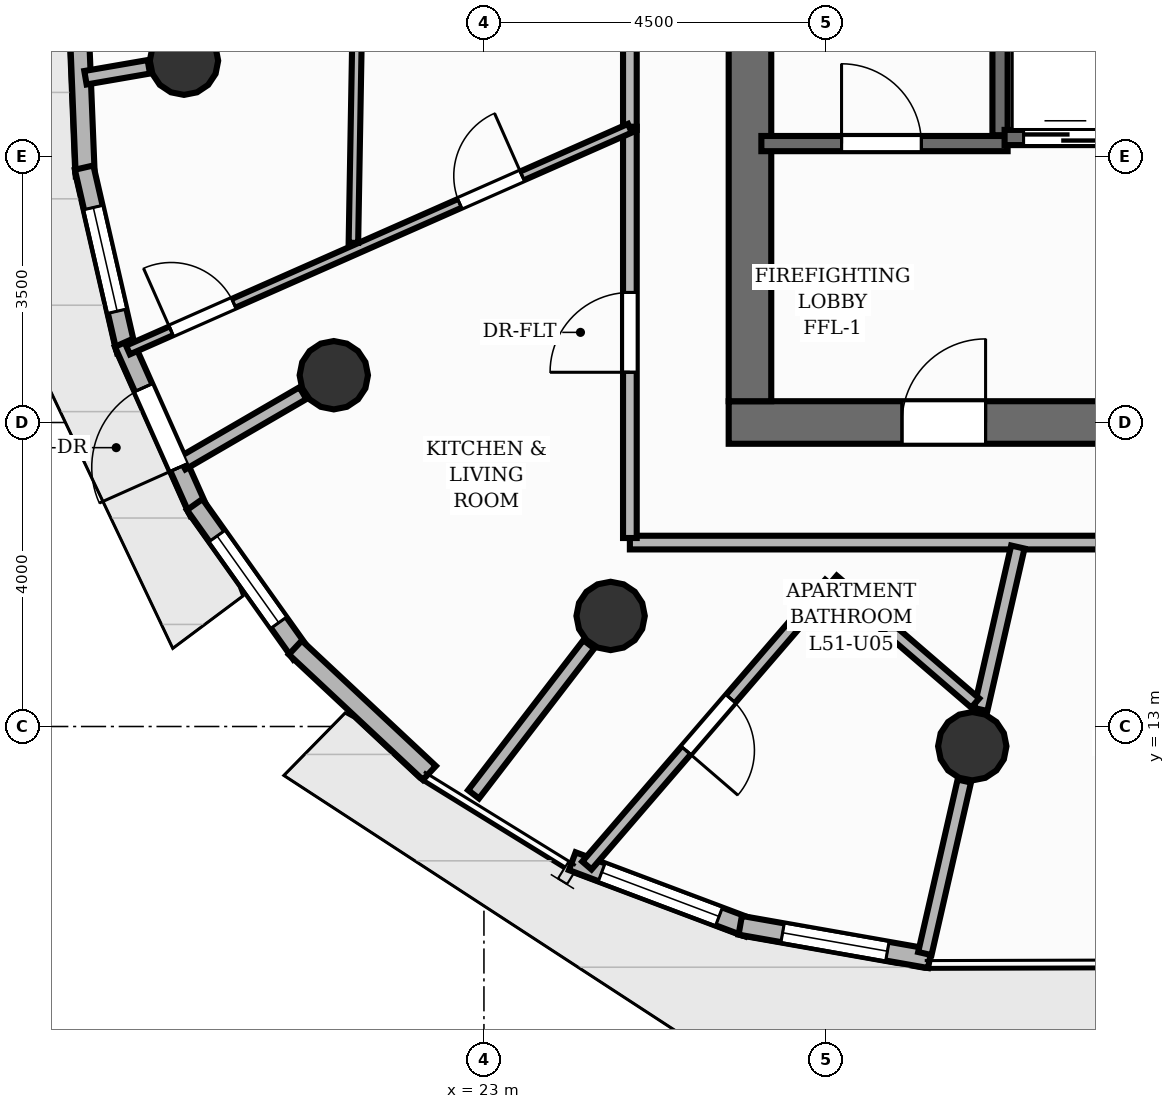
"""IFC4 building model, lengths in metres.
Left out: names, types, materials, properties, quantities, classifications, styles, units other than length and angle.
Written with IfcOpenShell. Run it as: python <this file> out.ifc"""

import sys

from ifc_helpers import new_model, si_unit, direction, frame, frame_2d, origin, origin_2d, place, context, subcontext, project, spatial, rectangle, circle, extrude, element, fill, save


model = new_model("IFC4")
c1 = context("Model", 3, precision=1e-05, world=origin(), true_north=direction((0.0, 1.0)))
c2 = subcontext(c1, "Body", "Model", "MODEL_VIEW")
j1 = project(units=[si_unit("LENGTHUNIT", "METRE"), si_unit("PLANEANGLEUNIT", "RADIAN")], contexts=[c1])
p1 = place(None, origin())
s1 = spatial("IfcSite", under=j1, at=p1, CompositionType="ELEMENT")
p2 = place(p1, origin())
s2 = spatial("IfcBuilding", under=s1, at=p2, CompositionType="ELEMENT")
p3 = place(p2, frame((0.0, 0.0, 172.64)))
s3 = spatial("IfcBuildingStorey", under=s2, at=p3, CompositionType="ELEMENT", Elevation=172.64)
p4 = place(p3, frame((26.22, 17.0, 0.0), z_axis=(0.0, 0.0, 1.0), x_axis=(1.0, 0.0, 0.0)))
e1 = element("IfcWall", 1, at=p4, inside=s3, PredefinedType="SHEAR", context=c2, shape_type="SweptSolid", body=[
    extrude(rectangle(XDim=11.56, YDim=0.56, at=frame_2d((5.78, 0.0))), origin(), (0.0, 0.0, 1.0), 3.2),
])
p5 = place(p4, frame((2.28, 0.0, 0.0)))
e2 = element("IfcOpeningElement", 2, at=p5, cuts=e1, PredefinedType="OPENING", context=c2, shape_type="SweptSolid", body=[
    extrude(rectangle(XDim=1.1, YDim=2.15, at=frame_2d((0.55, 1.075))), frame((0.0, 0.29, 0.0), z_axis=(0.0, -1.0, 0.0), x_axis=(1.0, 0.0, 0.0)), (0.0, 0.0, 1.0), 0.58),
])
p6 = place(p4, frame((5.83, 0.0, 0.0)))
e3 = element("IfcOpeningElement", 3, at=p6, cuts=e1, PredefinedType="OPENING", context=c2, shape_type="SweptSolid", body=[
    extrude(rectangle(XDim=0.9, YDim=2.1, at=frame_2d((0.45, 1.05))), frame((0.0, 0.29, 0.0), z_axis=(0.0, -1.0, 0.0), x_axis=(1.0, 0.0, 0.0)), (0.0, 0.0, 1.0), 0.58),
])
p7 = place(p3, frame((26.5, 17.28, 0.0), z_axis=(0.0, 0.0, 1.0), x_axis=(0.0, 1.0, 0.0)))
e4 = element("IfcWall", 4, at=p7, inside=s3, PredefinedType="SHEAR", context=c2, shape_type="SweptSolid", body=[
    extrude(rectangle(XDim=13.44, YDim=0.56, at=frame_2d((6.72, 0.0))), origin(), (0.0, 0.0, 1.0), 3.2),
])
for number, where, z_axis, x_axis in (
    (5, (19.054, 21.76, 0.0), (0.0, 0.0, 1.0), (1.0, 0.0, 0.0)),
    (6, (21.025, 17.622, 0.0), (0.0, 0.0, 1.0), (1.0, 0.0, 0.0)),
    (7, (24.667, 14.455, 0.0), (0.0, 0.0, 1.0), (1.0, 0.0, 0.0)),
    (8, (29.425, 12.74, 0.0), (0.0, 0.0, 1.0), (1.0, 0.0, 0.0)),
):
    element("IfcColumn", number, at=place(p3, frame(where, z_axis=z_axis, x_axis=x_axis)), inside=s3, PredefinedType="COLUMN", context=c2, shape_type="SweptSolid", body=[
        extrude(circle(Radius=0.45, at=origin_2d()), origin(), (0.0, 0.0, 1.0), 3.2),
    ])
p8 = place(p3, frame((17.755, 20.242, 0.0), z_axis=(0.0, 0.0, 1.0), x_axis=(-0.040399298921, 0.999183615081, 0.0)))
e9 = element("IfcWall", 9, at=p8, inside=s3, PredefinedType="SOLIDWALL", context=c2, shape_type="SweptSolid", body=[
    extrude(rectangle(XDim=2.532, YDim=0.25, at=frame_2d((1.266, 0.0))), origin(), (0.0, 0.0, 1.0), 2.96),
])
p9 = place(p3, frame((18.295, 17.939, 0.0), z_axis=(0.0, 0.0, 1.0), x_axis=(-0.224175769227, 0.974548728639, 0.0)))
e10 = element("IfcWall", 10, at=p9, inside=s3, PredefinedType="SOLIDWALL", context=c2, shape_type="SweptSolid", body=[
    extrude(rectangle(XDim=2.478, YDim=0.25, at=frame_2d((1.239, 0.0))), origin(), (0.0, 0.0, 1.0), 2.96),
])
p10 = place(p9, frame((0.539, 0.0, 0.85)))
e11 = element("IfcOpeningElement", 11, at=p10, cuts=e10, PredefinedType="OPENING", context=c2, shape_type="SweptSolid", body=[
    extrude(rectangle(XDim=1.4, YDim=1.55, at=frame_2d((0.7, 0.775))), frame((0.0, 0.135, 0.0), z_axis=(0.0, -1.0, 0.0), x_axis=(1.0, 0.0, 0.0)), (0.0, 0.0, 1.0), 0.27),
])
p11 = place(p3, frame((19.251, 15.821, 0.0), z_axis=(0.0, 0.0, 1.0), x_axis=(-0.407346511056, 0.913273682929, 0.0)))
e12 = element("IfcWall", 12, at=p11, inside=s3, PredefinedType="SOLIDWALL", context=c2, shape_type="SweptSolid", body=[
    extrude(rectangle(XDim=2.437, YDim=0.25, at=frame_2d((1.219, 0.0))), origin(), (0.0, 0.0, 1.0), 2.96),
])
p12 = place(p11, frame((0.643, 0.0, 0.0)))
e13 = element("IfcOpeningElement", 13, at=p12, cuts=e12, PredefinedType="OPENING", context=c2, shape_type="SweptSolid", body=[
    extrude(rectangle(XDim=1.15, YDim=2.2, at=frame_2d((0.575, 1.1))), frame((0.0, 0.135, 0.0), z_axis=(0.0, -1.0, 0.0), x_axis=(1.0, 0.0, 0.0)), (0.0, 0.0, 1.0), 0.27),
])
p13 = place(p3, frame((20.594, 13.953, 0.0), z_axis=(0.0, 0.0, 1.0), x_axis=(-0.579505880656, 0.814968057217, 0.0)))
e14 = element("IfcWall", 14, at=p13, inside=s3, PredefinedType="SOLIDWALL", context=c2, shape_type="SweptSolid", body=[
    extrude(rectangle(XDim=2.415, YDim=0.25, at=frame_2d((1.208, 0.0))), origin(), (0.0, 0.0, 1.0), 2.96),
])
p14 = place(p13, frame((0.507, 0.0, 0.85)))
e15 = element("IfcOpeningElement", 15, at=p14, cuts=e14, PredefinedType="OPENING", context=c2, shape_type="SweptSolid", body=[
    extrude(rectangle(XDim=1.4, YDim=1.55, at=frame_2d((0.7, 0.775))), frame((0.0, 0.135, 0.0), z_axis=(0.0, -1.0, 0.0), x_axis=(1.0, 0.0, 0.0)), (0.0, 0.0, 1.0), 0.27),
])
p15 = place(p3, frame((22.282, 12.389, 0.0), z_axis=(0.0, 0.0, 1.0), x_axis=(-0.730224222865, 0.683207570465, 0.0)))
e16 = element("IfcWall", 16, at=p15, inside=s3, PredefinedType="SOLIDWALL", context=c2, shape_type="SweptSolid", body=[
    extrude(rectangle(XDim=2.415, YDim=0.25, at=frame_2d((1.207, 0.0))), origin(), (0.0, 0.0, 1.0), 2.96),
])
p16 = place(p3, frame((26.481, 10.355, 0.0), z_axis=(0.0, 0.0, 1.0), x_axis=(-0.93586674787, 0.352354126172, 0.0)))
e17 = element("IfcWall", 17, at=p16, inside=s3, PredefinedType="SOLIDWALL", context=c2, shape_type="SweptSolid", body=[
    extrude(rectangle(XDim=2.478, YDim=0.25, at=frame_2d((1.239, 0.0))), origin(), (0.0, 0.0, 1.0), 2.96),
])
p17 = place(p16, frame((0.414, 0.0, 0.85)))
e18 = element("IfcOpeningElement", 18, at=p17, cuts=e17, PredefinedType="OPENING", context=c2, shape_type="SweptSolid", body=[
    extrude(rectangle(XDim=1.65, YDim=1.55, at=frame_2d((0.825, 0.775))), frame((0.0, 0.135, 0.0), z_axis=(0.0, -1.0, 0.0), x_axis=(1.0, 0.0, 0.0)), (0.0, 0.0, 1.0), 0.27),
])
p18 = place(p3, frame((28.865, 9.945, 0.0), z_axis=(0.0, 0.0, 1.0), x_axis=(-0.984837873762, 0.173477267688, 0.0)))
e19 = element("IfcWall", 19, at=p18, inside=s3, PredefinedType="SOLIDWALL", context=c2, shape_type="SweptSolid", body=[
    extrude(rectangle(XDim=2.532, YDim=0.25, at=frame_2d((1.266, 0.0))), origin(), (0.0, 0.0, 1.0), 2.96),
])
p19 = place(p18, frame((0.566, 0.0, 0.85)))
e20 = element("IfcOpeningElement", 20, at=p19, cuts=e19, PredefinedType="OPENING", context=c2, shape_type="SweptSolid", body=[
    extrude(rectangle(XDim=1.4, YDim=1.55, at=frame_2d((0.7, 0.775))), frame((0.0, 0.135, 0.0), z_axis=(0.0, -1.0, 0.0), x_axis=(1.0, 0.0, 0.0)), (0.0, 0.0, 1.0), 0.27),
])
p20 = place(p3, frame((29.79, 20.78, 0.0), z_axis=(0.0, 0.0, 1.0), x_axis=(0.0, 1.0, 0.0)))
e21 = element("IfcWall", 21, at=p20, inside=s3, PredefinedType="SHEAR", context=c2, shape_type="SweptSolid", body=[
    extrude(rectangle(XDim=6.44, YDim=0.2, at=frame_2d((3.22, 0.0))), origin(), (0.0, 0.0, 1.0), 3.2),
])
p21 = place(p3, frame((26.65, 20.67, 0.0), z_axis=(0.0, 0.0, 1.0), x_axis=(1.0, 0.0, 0.0)))
e22 = element("IfcWall", 22, at=p21, inside=s3, PredefinedType="SHEAR", context=c2, shape_type="SweptSolid", body=[
    extrude(rectangle(XDim=3.24, YDim=0.2, at=frame_2d((1.62, 0.0))), origin(), (0.0, 0.0, 1.0), 3.2),
])
p22 = place(p21, frame((1.055, 0.0, 0.0)))
e23 = element("IfcOpeningElement", 23, at=p22, cuts=e22, PredefinedType="OPENING", context=c2, shape_type="SweptSolid", body=[
    extrude(rectangle(XDim=1.05, YDim=2.15, at=frame_2d((0.525, 1.075))), frame((0.0, 0.11, 0.0), z_axis=(0.0, -1.0, 0.0), x_axis=(1.0, 0.0, 0.0)), (0.0, 0.0, 1.0), 0.22),
])
p23 = place(p3, frame((29.85, 20.75, 0.0), z_axis=(0.0, 0.0, 1.0), x_axis=(1.0, 0.0, 0.0)))
e24 = element("IfcWall", 24, at=p23, inside=s3, PredefinedType="SHEAR", context=c2, shape_type="SweptSolid", body=[
    extrude(rectangle(XDim=2.3, YDim=0.2, at=frame_2d((1.15, 0.0))), origin(), (0.0, 0.0, 1.0), 3.2),
])
p24 = place(p23, frame((0.25, 0.0, 0.0)))
e25 = element("IfcOpeningElement", 25, at=p24, cuts=e24, PredefinedType="OPENING", context=c2, shape_type="SweptSolid", body=[
    extrude(rectangle(XDim=1.1, YDim=2.15, at=frame_2d((0.55, 1.075))), frame((0.0, 0.11, 0.0), z_axis=(0.0, -1.0, 0.0), x_axis=(1.0, 0.0, 0.0)), (0.0, 0.0, 1.0), 0.22),
])
p25 = place(p3, frame((18.591, 21.68, 0.0), z_axis=(0.0, 0.0, 1.0), x_axis=(-0.985336508055, -0.170622290144, 0.0)))
e26 = element("IfcWall", 26, at=p25, inside=s3, PredefinedType="PARTITIONING", context=c2, shape_type="SweptSolid", body=[
    extrude(rectangle(XDim=0.846, YDim=0.18, at=frame_2d((0.423, 0.0))), origin(), (0.0, 0.0, 1.0), 2.404),
])
p26 = place(p3, frame((20.618, 17.386, 0.0), z_axis=(0.0, 0.0, 1.0), x_axis=(-0.864604991586, -0.502452195264, 0.0)))
e27 = element("IfcWall", 27, at=p26, inside=s3, PredefinedType="PARTITIONING", context=c2, shape_type="SweptSolid", body=[
    extrude(rectangle(XDim=1.841, YDim=0.18, at=frame_2d((0.92, 0.0))), origin(), (0.0, 0.0, 1.0), 2.404),
])
p27 = place(p3, frame((24.38, 14.082, 0.0), z_axis=(0.0, 0.0, 1.0), x_axis=(-0.609279402228, -0.792955616678, 0.0)))
e28 = element("IfcWall", 28, at=p27, inside=s3, PredefinedType="PARTITIONING", context=c2, shape_type="SweptSolid", body=[
    extrude(rectangle(XDim=2.49, YDim=0.18, at=frame_2d((1.245, 0.0))), origin(), (0.0, 0.0, 1.0), 2.404),
])
p28 = place(p3, frame((29.32, 12.282, 0.0), z_axis=(0.0, 0.0, 1.0), x_axis=(-0.222998449778, -0.974818799263, 0.0)))
e29 = element("IfcWall", 29, at=p28, inside=s3, PredefinedType="PARTITIONING", context=c2, shape_type="SweptSolid", body=[
    extrude(rectangle(XDim=2.329, YDim=0.18, at=frame_2d((1.164, 0.0))), origin(), (0.0, 0.0, 1.0), 2.404),
])
p29 = place(p3, frame((39.08, 15.42, 0.0), z_axis=(0.0, 0.0, 1.0), x_axis=(-1.0, 0.0, 0.0)))
e30 = element("IfcWall", 30, at=p29, inside=s3, PredefinedType="PARTITIONING", context=c2, shape_type="SweptSolid", body=[
    extrude(rectangle(XDim=14.16, YDim=0.18, at=frame_2d((7.08, 0.0))), origin(), (0.0, 0.0, 1.0), 2.955),
])
p30 = place(p29, frame((2.007, 0.0, 0.0)))
e31 = element("IfcOpeningElement", 31, at=p30, cuts=e30, PredefinedType="OPENING", context=c2, shape_type="SweptSolid", body=[
    extrude(rectangle(XDim=0.9, YDim=2.1, at=frame_2d((0.45, 1.05))), frame((0.0, 0.1, 0.0), z_axis=(0.0, -1.0, 0.0), x_axis=(1.0, 0.0, 0.0)), (0.0, 0.0, 1.0), 0.2),
])
p31 = place(p29, frame((6.287, 0.0, 0.0)))
e32 = element("IfcOpeningElement", 32, at=p31, cuts=e30, PredefinedType="OPENING", context=c2, shape_type="SweptSolid", body=[
    extrude(rectangle(XDim=0.9, YDim=2.1, at=frame_2d((0.45, 1.05))), frame((0.0, 0.1, 0.0), z_axis=(0.0, -1.0, 0.0), x_axis=(1.0, 0.0, 0.0)), (0.0, 0.0, 1.0), 0.2),
])
p32 = place(p3, frame((24.92, 20.85, 0.0), z_axis=(0.0, 0.0, 1.0), x_axis=(0.0, 1.0, 0.0)))
e33 = element("IfcWall", 33, at=p32, inside=s3, PredefinedType="PARTITIONING", context=c2, shape_type="SweptSolid", body=[
    extrude(rectangle(XDim=11.67, YDim=0.18, at=frame_2d((5.835, 0.0))), origin(), (0.0, 0.0, 1.0), 2.955),
])
p33 = place(p3, frame((24.92, 15.48, 0.0), z_axis=(0.0, 0.0, 1.0), x_axis=(0.0, 1.0, 0.0)))
e34 = element("IfcWall", 34, at=p33, inside=s3, PredefinedType="PARTITIONING", context=c2, shape_type="SweptSolid", body=[
    extrude(rectangle(XDim=5.412, YDim=0.18, at=frame_2d((2.706, 0.0))), origin(), (0.0, 0.0, 1.0), 2.955),
])
p34 = place(p33, frame((2.181, 0.0, 0.0)))
e35 = element("IfcOpeningElement", 35, at=p34, cuts=e34, PredefinedType="OPENING", context=c2, shape_type="SweptSolid", body=[
    extrude(rectangle(XDim=1.05, YDim=2.15, at=frame_2d((0.525, 1.075))), frame((0.0, 0.1, 0.0), z_axis=(0.0, -1.0, 0.0), x_axis=(1.0, 0.0, 0.0)), (0.0, 0.0, 1.0), 0.2),
])
p35 = place(p3, frame((29.535, 13.224, 0.0), z_axis=(0.0, 0.0, 1.0), x_axis=(0.222891307908, 0.97484330272, 0.0)))
e36 = element("IfcWall", 36, at=p35, inside=s3, PredefinedType="PARTITIONING", context=c2, shape_type="SweptSolid", body=[
    extrude(rectangle(XDim=2.193, YDim=0.18, at=frame_2d((1.096, 0.0))), origin(), (0.0, 0.0, 1.0), 2.404),
])
p36 = place(p3, frame((29.464, 13.309, 0.0), z_axis=(0.0, 0.0, 1.0), x_axis=(-0.757457065386, 0.652884977693, 0.0)))
e37 = element("IfcWall", 37, at=p36, inside=s3, PredefinedType="PLUMBINGWALL", context=c2, shape_type="SweptSolid", body=[
    extrude(rectangle(XDim=2.475, YDim=0.16, at=frame_2d((1.237, 0.0))), origin(), (0.0, 0.0, 1.0), 2.955),
])
p37 = place(p3, frame((27.55, 14.879, 0.0), z_axis=(0.0, 0.0, 1.0), x_axis=(-0.652871537105, -0.757468650201, 0.0)))
e38 = element("IfcWall", 38, at=p37, inside=s3, PredefinedType="PLUMBINGWALL", context=c2, shape_type="SweptSolid", body=[
    extrude(rectangle(XDim=4.895, YDim=0.16, at=frame_2d((2.447, 0.0))), origin(), (0.0, 0.0, 1.0), 2.955),
])
p38 = place(p37, frame((1.997, 0.0, 0.0)))
e39 = element("IfcOpeningElement", 39, at=p38, cuts=e38, PredefinedType="OPENING", context=c2, shape_type="SweptSolid", body=[
    extrude(rectangle(XDim=0.9, YDim=2.1, at=frame_2d((0.45, 1.05))), frame((0.0, 0.09, 0.0), z_axis=(0.0, -1.0, 0.0), x_axis=(1.0, 0.0, 0.0)), (0.0, 0.0, 1.0), 0.18),
])
p39 = place(p3, frame((18.317, 17.954, 0.0), z_axis=(0.0, 0.0, 1.0), x_axis=(0.914699105929, 0.404135553512, 0.0)))
e40 = element("IfcWall", 40, at=p39, inside=s3, PredefinedType="PARTITIONING", context=c2, shape_type="SweptSolid", body=[
    extrude(rectangle(XDim=7.219, YDim=0.125, at=frame_2d((3.609, 0.0))), origin(), (0.0, 0.0, 1.0), 2.692),
])
p40 = place(p39, frame((0.621, 0.0, 0.0)))
e41 = element("IfcOpeningElement", 41, at=p40, cuts=e40, PredefinedType="OPENING", context=c2, shape_type="SweptSolid", body=[
    extrude(rectangle(XDim=0.9, YDim=2.1, at=frame_2d((0.45, 1.05))), frame((0.0, 0.073, 0.0), z_axis=(0.0, -1.0, 0.0), x_axis=(1.0, 0.0, 0.0)), (0.0, 0.0, 1.0), 0.145),
])
p41 = place(p39, frame((4.77, 0.0, 0.0)))
e42 = element("IfcOpeningElement", 42, at=p41, cuts=e40, PredefinedType="OPENING", context=c2, shape_type="SweptSolid", body=[
    extrude(rectangle(XDim=0.9, YDim=2.1, at=frame_2d((0.45, 1.05))), frame((0.0, 0.073, 0.0), z_axis=(0.0, -1.0, 0.0), x_axis=(1.0, 0.0, 0.0)), (0.0, 0.0, 1.0), 0.145),
])
p42 = place(p3, frame((21.469, 30.019, 0.0), z_axis=(0.0, 0.0, 1.0), x_axis=(-0.017526694913, -0.999846395686, 0.0)))
e43 = element("IfcWall", 43, at=p42, inside=s3, PredefinedType="PARTITIONING", context=c2, shape_type="SweptSolid", body=[
    extrude(rectangle(XDim=10.656, YDim=0.125, at=frame_2d((5.328, 0.0))), origin(), (0.0, 0.0, 1.0), 2.955),
])
p43 = place(p12, origin())
e44 = element("IfcDoor", 44, at=p43, inside=s3, OperationType="SINGLE_SWING_LEFT", PredefinedType="DOOR", context=c2, shape_type="SweptSolid", body=[
    extrude(rectangle(XDim=1.15, YDim=2.2, at=frame_2d((0.575, 1.1))), frame((0.0, 0.025, 0.0), z_axis=(0.0, -1.0, 0.0), x_axis=(1.0, 0.0, 0.0)), (0.0, 0.0, 1.0), 0.05),
])
fill(e13, e44)
p44 = place(p10, origin())
e45 = element("IfcWindow", 45, at=p44, inside=s3, PartitioningType="SINGLE_PANEL", PredefinedType="WINDOW", context=c2, shape_type="SweptSolid", body=[
    extrude(rectangle(XDim=1.4, YDim=1.55, at=frame_2d((0.7, 0.775))), frame((0.0, 0.03, 0.0), z_axis=(0.0, -1.0, 0.0), x_axis=(1.0, 0.0, 0.0)), (0.0, 0.0, 1.0), 0.06),
])
fill(e11, e45)
p45 = place(p14, origin())
e46 = element("IfcWindow", 46, at=p45, inside=s3, PartitioningType="SINGLE_PANEL", PredefinedType="WINDOW", context=c2, shape_type="SweptSolid", body=[
    extrude(rectangle(XDim=1.4, YDim=1.55, at=frame_2d((0.7, 0.775))), frame((0.0, 0.03, 0.0), z_axis=(0.0, -1.0, 0.0), x_axis=(1.0, 0.0, 0.0)), (0.0, 0.0, 1.0), 0.06),
])
fill(e15, e46)
p46 = place(p17, origin())
e47 = element("IfcWindow", 47, at=p46, inside=s3, PartitioningType="SINGLE_PANEL", PredefinedType="WINDOW", context=c2, shape_type="SweptSolid", body=[
    extrude(rectangle(XDim=1.65, YDim=1.55, at=frame_2d((0.825, 0.775))), frame((0.0, 0.03, 0.0), z_axis=(0.0, -1.0, 0.0), x_axis=(1.0, 0.0, 0.0)), (0.0, 0.0, 1.0), 0.06),
])
fill(e18, e47)
p47 = place(p19, origin())
e48 = element("IfcWindow", 48, at=p47, inside=s3, PartitioningType="SINGLE_PANEL", PredefinedType="WINDOW", context=c2, shape_type="SweptSolid", body=[
    extrude(rectangle(XDim=1.4, YDim=1.55, at=frame_2d((0.7, 0.775))), frame((0.0, 0.03, 0.0), z_axis=(0.0, -1.0, 0.0), x_axis=(1.0, 0.0, 0.0)), (0.0, 0.0, 1.0), 0.06),
])
fill(e20, e48)
p48 = place(p22, origin())
e49 = element("IfcDoor", 49, at=p48, inside=s3, OperationType="SINGLE_SWING_LEFT", PredefinedType="DOOR", context=c2, shape_type="SweptSolid", body=[
    extrude(rectangle(XDim=1.05, YDim=2.15, at=frame_2d((0.525, 1.075))), frame((0.0, 0.025, 0.0), z_axis=(0.0, -1.0, 0.0), x_axis=(1.0, 0.0, 0.0)), (0.0, 0.0, 1.0), 0.05),
])
fill(e23, e49)
p49 = place(p5, origin())
e50 = element("IfcDoor", 50, at=p49, inside=s3, OperationType="SINGLE_SWING_RIGHT", PredefinedType="DOOR", context=c2, shape_type="SweptSolid", body=[
    extrude(rectangle(XDim=1.1, YDim=2.15, at=frame_2d((0.55, 1.075))), frame((0.0, 0.025, 0.0), z_axis=(0.0, -1.0, 0.0), x_axis=(1.0, 0.0, 0.0)), (0.0, 0.0, 1.0), 0.05),
])
fill(e2, e50)
p50 = place(p24, origin())
e51 = element("IfcDoor", 51, at=p50, inside=s3, OperationType="DOUBLE_DOOR_SLIDING", PredefinedType="DOOR", context=c2, shape_type="SweptSolid", body=[
    extrude(rectangle(XDim=1.1, YDim=2.15, at=frame_2d((0.55, 1.075))), frame((0.0, 0.025, 0.0), z_axis=(0.0, -1.0, 0.0), x_axis=(1.0, 0.0, 0.0)), (0.0, 0.0, 1.0), 0.05),
])
fill(e25, e51)
p51 = place(p34, origin())
e52 = element("IfcDoor", 52, at=p51, inside=s3, OperationType="SINGLE_SWING_LEFT", PredefinedType="DOOR", context=c2, shape_type="SweptSolid", body=[
    extrude(rectangle(XDim=1.05, YDim=2.15, at=frame_2d((0.525, 1.075))), frame((0.0, 0.025, 0.0), z_axis=(0.0, -1.0, 0.0), x_axis=(1.0, 0.0, 0.0)), (0.0, 0.0, 1.0), 0.05),
])
fill(e35, e52)
p52 = place(p38, origin())
e53 = element("IfcDoor", 53, at=p52, inside=s3, OperationType="SINGLE_SWING_RIGHT", PredefinedType="DOOR", context=c2, shape_type="SweptSolid", body=[
    extrude(rectangle(XDim=0.9, YDim=2.1, at=frame_2d((0.45, 1.05))), frame((0.0, 0.025, 0.0), z_axis=(0.0, -1.0, 0.0), x_axis=(1.0, 0.0, 0.0)), (0.0, 0.0, 1.0), 0.05),
])
fill(e39, e53)
p53 = place(p40, origin())
e54 = element("IfcDoor", 54, at=p53, inside=s3, OperationType="SINGLE_SWING_LEFT", PredefinedType="DOOR", context=c2, shape_type="SweptSolid", body=[
    extrude(rectangle(XDim=0.9, YDim=2.1, at=frame_2d((0.45, 1.05))), frame((0.0, 0.025, 0.0), z_axis=(0.0, -1.0, 0.0), x_axis=(1.0, 0.0, 0.0)), (0.0, 0.0, 1.0), 0.05),
])
fill(e41, e54)
p54 = place(p41, origin())
e55 = element("IfcDoor", 55, at=p54, inside=s3, OperationType="SINGLE_SWING_RIGHT", PredefinedType="DOOR", context=c2, shape_type="SweptSolid", body=[
    extrude(rectangle(XDim=0.9, YDim=2.1, at=frame_2d((0.45, 1.05))), frame((0.0, 0.025, 0.0), z_axis=(0.0, -1.0, 0.0), x_axis=(1.0, 0.0, 0.0)), (0.0, 0.0, 1.0), 0.05),
])
fill(e42, e55)
save(model, sys.argv[1])
